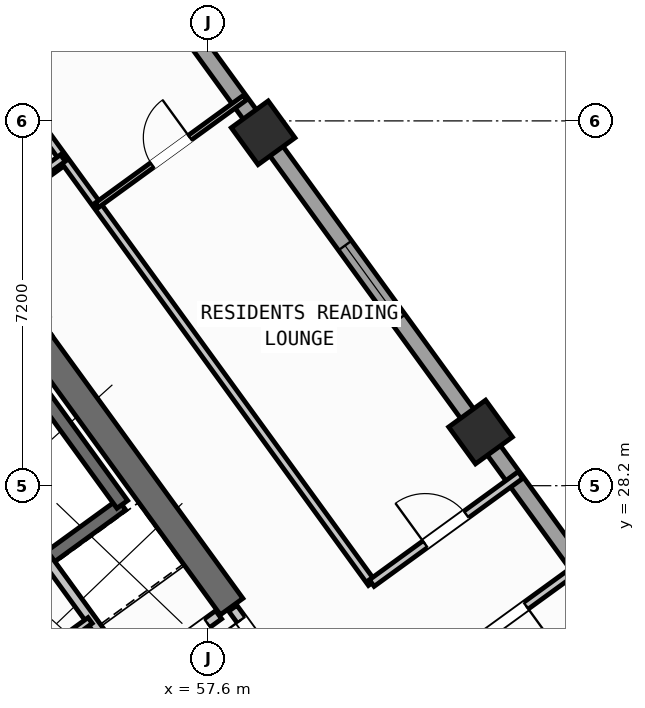
"""IFC4 building model, lengths in metres.
Left out: names, types, materials, properties, quantities, classifications, styles, units other than length and angle.
Written with IfcOpenShell. Run it as: python <this file> out.ifc"""

import sys

from ifc_helpers import new_model, si_unit, direction, frame, frame_2d, origin, origin_2d, place, context, subcontext, project, spatial, rectangle, hollow_rectangle, extrude, source, transform, mapped, element, fill, save


model = new_model("IFC4")
c1 = context("Model", 3, precision=1e-05, world=origin(), true_north=direction((0.0, 1.0)))
c2 = subcontext(c1, "Body", "Model", "MODEL_VIEW")
j1 = project(units=[si_unit("LENGTHUNIT", "METRE"), si_unit("PLANEANGLEUNIT", "RADIAN")], contexts=[c1])
p1 = place(None, origin())
s1 = spatial("IfcSite", under=j1, at=p1, CompositionType="ELEMENT")
p2 = place(p1, origin())
s2 = spatial("IfcBuilding", under=s1, at=p2, CompositionType="ELEMENT")
p3 = place(p2, frame((0.0, 0.0, 119.7)))
s3 = spatial("IfcBuildingStorey", under=s2, at=p3, CompositionType="ELEMENT", Elevation=119.7)
p4 = place(p3, frame((58.064, 25.813, 0.0), z_axis=(0.0, 0.0, 1.0), x_axis=(-0.587764933797, 0.809031756236, 0.0)))
e1 = element("IfcWall", 1, at=p4, inside=s3, PredefinedType="SHEAR", context=c2, shape_type="SweptSolid", body=[
    extrude(rectangle(XDim=6.425, YDim=0.55, at=frame_2d((3.212, 0.0))), origin(), (0.0, 0.0, 1.0), 3.35),
])
m1 = source(origin(), c2, "Body", "SweptSolid", [
    extrude(hollow_rectangle(XDim=0.9, YDim=0.9, WallThickness=0.036, at=origin_2d()), origin(), (0.0, 0.0, 1.0), 3.6),
])
for number, where, z_axis, x_axis in (
    (2, (62.977, 29.259, 0.0), (0.0, 0.0, 1.0), (0.809, 0.588, 0.0)),
    (3, (58.686, 35.165, 0.0), (0.0, 0.0, 1.0), (0.809, 0.588, 0.0)),
):
    element("IfcColumn", number, at=place(p3, frame(where, z_axis=z_axis, x_axis=x_axis)), inside=s3, PredefinedType="COLUMN", context=c2, shape_type="MappedRepresentation", body=[
        mapped(m1, transform((0.0, 0.0, 0.0), scale=1.0)),
    ])
p5 = place(p3, frame((42.207, 31.597, 0.0), z_axis=(0.0, 0.0, 1.0), x_axis=(0.809020333377, 0.587780656523, 0.0)))
e4 = element("IfcWall", 4, at=p5, inside=s3, PredefinedType="STANDARD", context=c2, shape_type="SweptSolid", body=[
    extrude(rectangle(XDim=15.223, YDim=0.32, at=frame_2d((7.611, 0.0))), origin(), (0.0, 0.0, 1.0), 3.35),
])
p6 = place(p5, frame((12.82, 0.0, 0.0)))
e5 = element("IfcOpeningElement", 5, at=p6, cuts=e4, PredefinedType="OPENING", context=c2, shape_type="SweptSolid", body=[
    extrude(rectangle(XDim=1.05, YDim=2.15, at=frame_2d((0.525, 1.075))), frame((0.0, 0.17, 0.0), z_axis=(0.0, -1.0, 0.0), x_axis=(1.0, 0.0, 0.0)), (0.0, 0.0, 1.0), 0.34),
])
p7 = place(p5, frame((1.52, 0.0, 0.8)))
e6 = element("IfcOpeningElement", 6, at=p7, cuts=e4, PredefinedType="OPENING", context=c2, shape_type="SweptSolid", body=[
    extrude(rectangle(XDim=2.1, YDim=1.55, at=frame_2d((1.05, 0.775))), frame((0.0, 0.17, 0.0), z_axis=(0.0, -1.0, 0.0), x_axis=(1.0, 0.0, 0.0)), (0.0, 0.0, 1.0), 0.34),
])
p8 = place(p5, frame((5.76, 0.0, 0.8)))
e7 = element("IfcOpeningElement", 7, at=p8, cuts=e4, PredefinedType="OPENING", context=c2, shape_type="SweptSolid", body=[
    extrude(rectangle(XDim=2.1, YDim=1.55, at=frame_2d((1.05, 0.775))), frame((0.0, 0.17, 0.0), z_axis=(0.0, -1.0, 0.0), x_axis=(1.0, 0.0, 0.0)), (0.0, 0.0, 1.0), 0.34),
])
p9 = place(p5, frame((10.219, 0.0, 1.0)))
e8 = element("IfcOpeningElement", 8, at=p9, cuts=e4, PredefinedType="OPENING", context=c2, shape_type="SweptSolid", body=[
    extrude(rectangle(XDim=0.9, YDim=1.25, at=frame_2d((0.45, 0.625))), frame((0.0, 0.17, 0.0), z_axis=(0.0, -1.0, 0.0), x_axis=(1.0, 0.0, 0.0)), (0.0, 0.0, 1.0), 0.34),
])
p10 = place(p3, frame((54.81, 40.5, 0.0), z_axis=(0.0, 0.0, 1.0), x_axis=(0.587783625747, -0.809018176127, 0.0)))
e9 = element("IfcWall", 9, at=p10, inside=s3, PredefinedType="STANDARD", context=c2, shape_type="SweptSolid", body=[
    extrude(rectangle(XDim=21.587, YDim=0.32, at=frame_2d((10.794, 0.0))), origin(), (0.0, 0.0, 1.0), 2.775),
])
p11 = place(p10, frame((2.143, 0.0, 0.8)))
e10 = element("IfcOpeningElement", 10, at=p11, cuts=e9, PredefinedType="OPENING", context=c2, shape_type="SweptSolid", body=[
    extrude(rectangle(XDim=2.1, YDim=1.55, at=frame_2d((1.05, 0.775))), frame((0.0, 0.17, 0.0), z_axis=(0.0, -1.0, 0.0), x_axis=(1.0, 0.0, 0.0)), (0.0, 0.0, 1.0), 0.34),
])
p12 = place(p10, frame((9.344, 0.0, 0.85)))
e11 = element("IfcOpeningElement", 11, at=p12, cuts=e9, PredefinedType="OPENING", context=c2, shape_type="SweptSolid", body=[
    extrude(rectangle(XDim=1.8, YDim=1.5, at=frame_2d((0.9, 0.75))), frame((0.0, 0.17, 0.0), z_axis=(0.0, -1.0, 0.0), x_axis=(1.0, 0.0, 0.0)), (0.0, 0.0, 1.0), 0.34),
])
p13 = place(p10, frame((18.309, 0.0, 0.85)))
e12 = element("IfcOpeningElement", 12, at=p13, cuts=e9, PredefinedType="OPENING", context=c2, shape_type="SweptSolid", body=[
    extrude(rectangle(XDim=1.5, YDim=1.5, at=frame_2d((0.75, 0.75))), frame((0.0, 0.17, 0.0), z_axis=(0.0, -1.0, 0.0), x_axis=(1.0, 0.0, 0.0)), (0.0, 0.0, 1.0), 0.34),
])
p14 = place(p3, frame((49.863, 23.44, 0.0), z_axis=(0.0, 0.0, 1.0), x_axis=(0.809003474932, 0.587803859759, 0.0)))
e13 = element("IfcWall", 13, at=p14, inside=s3, PredefinedType="SHEAR", context=c2, shape_type="SweptSolid", body=[
    extrude(rectangle(XDim=7.46, YDim=0.26, at=frame_2d((3.73, 0.0))), origin(), (0.0, 0.0, 1.0), 3.35),
])
p15 = place(p14, frame((0.36, 0.0, 0.0)))
e14 = element("IfcOpeningElement", 14, at=p15, cuts=e13, PredefinedType="OPENING", context=c2, shape_type="SweptSolid", body=[
    extrude(rectangle(XDim=0.86, YDim=2.05, at=frame_2d((0.43, 1.025))), frame((0.0, 0.14, 0.0), z_axis=(0.0, -1.0, 0.0), x_axis=(1.0, 0.0, 0.0)), (0.0, 0.0, 1.0), 0.28),
])
p16 = place(p3, frame((55.906, 27.831, 0.0), z_axis=(0.0, 0.0, 1.0), x_axis=(-0.587804123638, 0.809003283204, 0.0)))
e15 = element("IfcWall", 15, at=p16, inside=s3, PredefinedType="SHEAR", context=c2, shape_type="SweptSolid", body=[
    extrude(rectangle(XDim=3.16, YDim=0.26, at=frame_2d((1.58, 0.0))), origin(), (0.0, 0.0, 1.0), 3.35),
])
p17 = place(p3, frame((56.111, 24.419, 0.0), z_axis=(0.0, 0.0, 1.0), x_axis=(-0.58777848983, 0.809021907548, 0.0)))
e16 = element("IfcWall", 16, at=p17, inside=s3, PredefinedType="STANDARD", context=c2, shape_type="SweptSolid", body=[
    extrude(rectangle(XDim=2.88, YDim=0.2, at=frame_2d((1.44, 0.0))), origin(), (0.0, 0.0, 1.0), 3.34),
])
p18 = place(p3, frame((53.425, 22.468, 0.0), z_axis=(0.0, 0.0, 1.0), x_axis=(0.809024377198, 0.587775090574, 0.0)))
e17 = element("IfcWall", 17, at=p18, inside=s3, PredefinedType="STANDARD", context=c2, shape_type="SweptSolid", body=[
    extrude(rectangle(XDim=5.418, YDim=0.2, at=frame_2d((2.709, 0.0))), origin(), (0.0, 0.0, 1.0), 3.34),
])
p19 = place(p18, frame((4.28, 0.0, 0.0)))
e18 = element("IfcOpeningElement", 18, at=p19, cuts=e17, PredefinedType="OPENING", context=c2, shape_type="SweptSolid", body=[
    extrude(rectangle(XDim=0.86, YDim=2.05, at=frame_2d((0.43, 1.025))), frame((0.0, 0.11, 0.0), z_axis=(0.0, -1.0, 0.0), x_axis=(1.0, 0.0, 0.0)), (0.0, 0.0, 1.0), 0.22),
])
p20 = place(p18, frame((1.45, 0.0, 0.0)))
e19 = element("IfcOpeningElement", 19, at=p20, cuts=e17, PredefinedType="OPENING", context=c2, shape_type="SweptSolid", body=[
    extrude(rectangle(XDim=0.86, YDim=2.05, at=frame_2d((0.43, 1.025))), frame((0.0, 0.11, 0.0), z_axis=(0.0, -1.0, 0.0), x_axis=(1.0, 0.0, 0.0)), (0.0, 0.0, 1.0), 0.22),
])
p21 = place(p3, frame((52.618, 23.612, 0.0), z_axis=(0.0, 0.0, 1.0), x_axis=(0.809009587469, 0.587795446889, 0.0)))
e20 = element("IfcWall", 20, at=p21, inside=s3, PredefinedType="PLUMBINGWALL", context=c2, shape_type="SweptSolid", body=[
    extrude(rectangle(XDim=3.28, YDim=0.14, at=frame_2d((1.64, 0.0))), origin(), (0.0, 0.0, 1.0), 3.34),
])
p22 = place(p21, frame((1.2, 0.0, 0.0)))
e21 = element("IfcOpeningElement", 21, at=p22, cuts=e20, PredefinedType="OPENING", context=c2, shape_type="SweptSolid", body=[
    extrude(rectangle(XDim=0.78, YDim=2.05, at=frame_2d((0.39, 1.025))), frame((0.0, 0.08, 0.0), z_axis=(0.0, -1.0, 0.0), x_axis=(1.0, 0.0, 0.0)), (0.0, 0.0, 1.0), 0.16),
])
p23 = place(p3, frame((59.827, 23.386, 0.0), z_axis=(0.0, 0.0, 1.0), x_axis=(-0.587803840107, 0.809003489211, 0.0)))
e22 = element("IfcWall", 22, at=p23, inside=s3, PredefinedType="STANDARD", context=c2, shape_type="SweptSolid", body=[
    extrude(rectangle(XDim=2.96, YDim=0.2, at=frame_2d((1.48, 0.0))), origin(), (0.0, 0.0, 1.0), 3.34),
])
p24 = place(p23, frame((1.68, 0.0, 0.0)))
e23 = element("IfcOpeningElement", 23, at=p24, cuts=e22, PredefinedType="OPENING", context=c2, shape_type="SweptSolid", body=[
    extrude(rectangle(XDim=1.0, YDim=2.1, at=frame_2d((0.5, 1.05))), frame((0.0, 0.11, 0.0), z_axis=(0.0, -1.0, 0.0), x_axis=(1.0, 0.0, 0.0)), (0.0, 0.0, 1.0), 0.22),
])
p25 = place(p3, frame((52.739, 33.143, 0.0), z_axis=(0.0, 0.0, 1.0), x_axis=(0.809000999347, 0.58780726693, 0.0)))
e24 = element("IfcWall", 24, at=p25, inside=s3, PredefinedType="PARTITIONING", context=c2, shape_type="SweptSolid", body=[
    extrude(rectangle(XDim=2.51, YDim=0.16, at=frame_2d((1.255, 0.0))), origin(), (0.0, 0.0, 1.0), 3.34),
])
p26 = place(p3, frame((60.829, 26.278, 0.0), z_axis=(0.0, 0.0, 1.0), x_axis=(-0.587777474174, 0.809022645451, 0.0)))
e25 = element("IfcWall", 25, at=p26, inside=s3, PredefinedType="PARTITIONING", context=c2, shape_type="SweptSolid", body=[
    extrude(rectangle(XDim=15.1, YDim=0.16, at=frame_2d((7.55, 0.0))), origin(), (0.0, 0.0, 1.0), 3.34),
])
p27 = place(p3, frame((62.093, 24.538, 0.0), z_axis=(0.0, 0.0, 1.0), x_axis=(0.809035546126, 0.58775971715, 0.0)))
e26 = element("IfcWall", 26, at=p27, inside=s3, PredefinedType="PARTITIONING", context=c2, shape_type="SweptSolid", body=[
    extrude(rectangle(XDim=3.63, YDim=0.16, at=frame_2d((1.815, 0.0))), origin(), (0.0, 0.0, 1.0), 3.34),
])
p28 = place(p27, frame((1.2, 0.0, 0.0)))
e27 = element("IfcOpeningElement", 27, at=p28, cuts=e26, PredefinedType="OPENING", context=c2, shape_type="SweptSolid", body=[
    extrude(rectangle(XDim=1.0, YDim=2.1, at=frame_2d((0.5, 1.05))), frame((0.0, 0.09, 0.0), z_axis=(0.0, -1.0, 0.0), x_axis=(1.0, 0.0, 0.0)), (0.0, 0.0, 1.0), 0.18),
])
p29 = place(p3, frame((60.829, 26.278, 0.0), z_axis=(0.0, 0.0, 1.0), x_axis=(0.809003564202, 0.587803736896, 0.0)))
e28 = element("IfcWall", 28, at=p29, inside=s3, PredefinedType="PARTITIONING", context=c2, shape_type="SweptSolid", body=[
    extrude(rectangle(XDim=3.63, YDim=0.16, at=frame_2d((1.815, 0.0))), origin(), (0.0, 0.0, 1.0), 3.34),
])
p30 = place(p29, frame((1.305, 0.0, 0.0)))
e29 = element("IfcOpeningElement", 29, at=p30, cuts=e28, PredefinedType="OPENING", context=c2, shape_type="SweptSolid", body=[
    extrude(rectangle(XDim=1.0, YDim=2.1, at=frame_2d((0.5, 1.05))), frame((0.0, 0.09, 0.0), z_axis=(0.0, -1.0, 0.0), x_axis=(1.0, 0.0, 0.0)), (0.0, 0.0, 1.0), 0.18),
])
p31 = place(p3, frame((55.409, 33.738, 0.0), z_axis=(0.0, 0.0, 1.0), x_axis=(0.809005039917, 0.58780170584, 0.0)))
e30 = element("IfcWall", 30, at=p31, inside=s3, PredefinedType="PARTITIONING", context=c2, shape_type="SweptSolid", body=[
    extrude(rectangle(XDim=3.61, YDim=0.11, at=frame_2d((1.805, 0.0))), origin(), (0.0, 0.0, 1.0), 3.34),
])
p32 = place(p31, frame((1.345, 0.0, 0.0)))
e31 = element("IfcOpeningElement", 31, at=p32, cuts=e30, PredefinedType="OPENING", context=c2, shape_type="SweptSolid", body=[
    extrude(rectangle(XDim=0.92, YDim=2.08, at=frame_2d((0.46, 1.04))), frame((0.0, 0.065, 0.0), z_axis=(0.0, -1.0, 0.0), x_axis=(1.0, 0.0, 0.0)), (0.0, 0.0, 1.0), 0.13),
])
p33 = place(p3, frame((42.866, 26.044, 0.0), z_axis=(0.0, 0.0, 1.0), x_axis=(0.809020254154, 0.587780765566, 0.0)))
e32 = element("IfcWall", 32, at=p33, inside=s3, PredefinedType="PARTITIONING", context=c2, shape_type="SweptSolid", body=[
    extrude(rectangle(XDim=14.67, YDim=0.16, at=frame_2d((7.335, 0.0))), origin(), (0.0, 0.0, 1.0), 3.34),
])
p34 = place(p33, frame((10.2, 0.0, 0.0)))
e33 = element("IfcOpeningElement", 33, at=p34, cuts=e32, PredefinedType="OPENING", context=c2, shape_type="SweptSolid", body=[
    extrude(rectangle(XDim=1.0, YDim=2.1, at=frame_2d((0.5, 1.05))), frame((0.0, 0.09, 0.0), z_axis=(0.0, -1.0, 0.0), x_axis=(1.0, 0.0, 0.0)), (0.0, 0.0, 1.0), 0.18),
])
m2 = source(origin(), c2, "Body", "SweptSolid", [
    extrude(rectangle(XDim=1.8, YDim=1.5, at=frame_2d((0.9, 0.75))), frame((0.0, 0.03, 0.0), z_axis=(0.0, -1.0, 0.0), x_axis=(1.0, 0.0, 0.0)), (0.0, 0.0, 1.0), 0.06),
])
p35 = place(p12, origin())
e34 = element("IfcWindow", 34, at=p35, inside=s3, PartitioningType="SINGLE_PANEL", PredefinedType="WINDOW", context=c2, shape_type="MappedRepresentation", body=[
    mapped(m2, transform((0.0, 0.0, 0.0), scale=1.0)),
])
fill(e11, e34)
m3 = source(origin(), c2, "Body", "SweptSolid", [
    extrude(rectangle(XDim=0.86, YDim=2.05, at=frame_2d((0.43, 1.025))), frame((0.0, 0.025, 0.0), z_axis=(0.0, -1.0, 0.0), x_axis=(1.0, 0.0, 0.0)), (0.0, 0.0, 1.0), 0.05),
])
p36 = place(p19, frame((0.86, 0.0, 0.0), z_axis=(0.0, 0.0, 1.0), x_axis=(-1.0, 0.0, 0.0)))
e35 = element("IfcDoor", 35, at=p36, inside=s3, OperationType="SINGLE_SWING_LEFT", PredefinedType="DOOR", context=c2, shape_type="MappedRepresentation", body=[
    mapped(m3, transform((0.0, 0.0, 0.0), scale=1.0)),
])
fill(e18, e35)
m4 = source(origin(), c2, "Body", "SweptSolid", [
    extrude(rectangle(XDim=1.0, YDim=2.1, at=frame_2d((0.5, 1.05))), frame((0.0, 0.025, 0.0), z_axis=(0.0, -1.0, 0.0), x_axis=(1.0, 0.0, 0.0)), (0.0, 0.0, 1.0), 0.05),
])
p37 = place(p24, origin())
e36 = element("IfcDoor", 36, at=p37, inside=s3, OperationType="SINGLE_SWING_RIGHT", PredefinedType="DOOR", context=c2, shape_type="MappedRepresentation", body=[
    mapped(m4, transform((0.0, 0.0, 0.0), scale=1.0)),
])
fill(e23, e36)
p38 = place(p30, origin())
e37 = element("IfcDoor", 37, at=p38, inside=s3, OperationType="SINGLE_SWING_LEFT", PredefinedType="DOOR", context=c2, shape_type="MappedRepresentation", body=[
    mapped(m4, transform((0.0, 0.0, 0.0), scale=1.0)),
])
fill(e29, e37)
m5 = source(origin(), c2, "Body", "SweptSolid", [
    extrude(rectangle(XDim=0.92, YDim=2.08, at=frame_2d((0.46, 1.04))), frame((0.0, 0.025, 0.0), z_axis=(0.0, -1.0, 0.0), x_axis=(1.0, 0.0, 0.0)), (0.0, 0.0, 1.0), 0.05),
])
p39 = place(p32, origin())
e38 = element("IfcDoor", 38, at=p39, inside=s3, OperationType="SINGLE_SWING_RIGHT", PredefinedType="DOOR", context=c2, shape_type="MappedRepresentation", body=[
    mapped(m5, transform((0.0, 0.0, 0.0), scale=1.0)),
])
fill(e31, e38)
p40 = place(p28, frame((1.0, 0.0, 0.0), z_axis=(0.0, 0.0, 1.0), x_axis=(-1.0, 0.0, 0.0)))
e39 = element("IfcDoor", 39, at=p40, inside=s3, OperationType="SINGLE_SWING_LEFT", PredefinedType="DOOR", context=c2, shape_type="MappedRepresentation", body=[
    mapped(m4, transform((0.0, 0.0, 0.0), scale=1.0)),
])
fill(e27, e39)
save(model, sys.argv[1])
